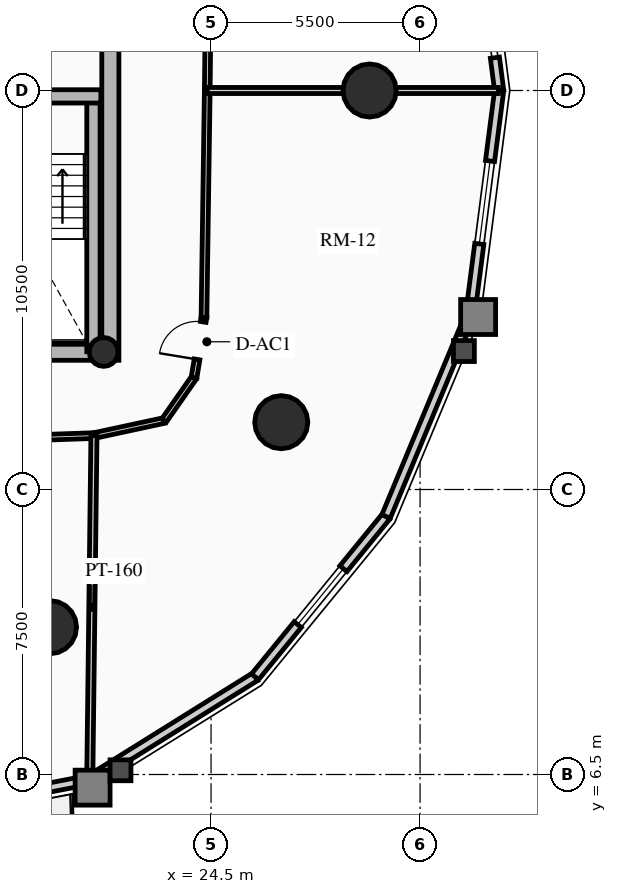
"""IFC4 building model, lengths in metres.
Left out: names, types, materials, properties, quantities, classifications, styles, units other than length and angle.
Written with IfcOpenShell. Run it as: python <this file> out.ifc"""

import sys

from ifc_helpers import new_model, si_unit, direction, frame, frame_2d, origin, origin_2d, place, context, subcontext, project, spatial, rectangle, circle, hollow_circle, extrude, source, transform, mapped, element, fill, save


model = new_model("IFC4")
c1 = context("Model", 3, precision=1e-05, world=origin(), true_north=direction((0.0, 1.0)))
c2 = subcontext(c1, "Body", "Model", "MODEL_VIEW")
j1 = project(units=[si_unit("LENGTHUNIT", "METRE"), si_unit("PLANEANGLEUNIT", "RADIAN")], contexts=[c1])
p1 = place(None, origin())
s1 = spatial("IfcSite", under=j1, at=p1, CompositionType="ELEMENT")
p2 = place(p1, origin())
s2 = spatial("IfcBuilding", under=s1, at=p2, CompositionType="ELEMENT")
p3 = place(p2, frame((0.0, 0.0, 75.97)))
s3 = spatial("IfcBuildingStorey", under=s2, at=p3, CompositionType="ELEMENT", Elevation=75.97)
p4 = place(p3, frame((21.85, 17.4, 0.0), z_axis=(0.0, 0.0, 1.0), x_axis=(0.0, 1.0, 0.0)))
e1 = element("IfcWall", 1, at=p4, inside=s3, PredefinedType="SHEAR", context=c2, shape_type="SweptSolid", body=[
    extrude(rectangle(XDim=14.2, YDim=0.45, at=frame_2d((7.1, 0.0))), origin(), (0.0, 0.0, 1.0), 2.91),
])
p5 = place(p3, frame((11.15, 17.625, 0.0), z_axis=(0.0, 0.0, 1.0), x_axis=(1.0, 0.0, 0.0)))
e2 = element("IfcWall", 2, at=p5, inside=s3, PredefinedType="SHEAR", context=c2, shape_type="SweptSolid", body=[
    extrude(rectangle(XDim=10.7, YDim=0.45, at=frame_2d((5.35, 0.0))), origin(), (0.0, 0.0, 1.0), 2.91),
])
m1 = source(origin(), c2, "Body", "SweptSolid", [
    extrude(rectangle(XDim=1.5, YDim=2.02, at=frame_2d((0.75, 1.01))), frame((0.0, 0.235, 0.0), z_axis=(0.0, -1.0, 0.0), x_axis=(1.0, 0.0, 0.0)), (0.0, 0.0, 1.0), 0.47),
])
p6 = place(p5, frame((5.45, 0.0, 0.0)))
e3 = element("IfcOpeningElement", 3, at=p6, cuts=e2, PredefinedType="OPENING", context=c2, shape_type="MappedRepresentation", body=[
    mapped(m1, transform((0.0, 0.0, 0.0), x_axis=(1.0, 0.0, 0.0), y_axis=(0.0, 1.0, 0.0), z_axis=(0.0, 0.0, 1.0), scale=1.0)),
])
p7 = place(p3, frame((21.405, 17.625, 0.0), z_axis=(0.0, 0.0, 1.0), x_axis=(0.0, 1.0, 0.0)))
e4 = element("IfcWall", 4, at=p7, inside=s3, PredefinedType="SHEAR", context=c2, shape_type="SweptSolid", body=[
    extrude(rectangle(XDim=6.72, YDim=0.35, at=frame_2d((3.36, 0.0))), origin(), (0.0, 0.0, 1.0), 2.91),
])
p8 = place(p3, frame((18.315, 24.345, 0.0), z_axis=(0.0, 0.0, 1.0), x_axis=(1.0, 0.0, 0.0)))
e5 = element("IfcWall", 5, at=p8, inside=s3, PredefinedType="SHEAR", context=c2, shape_type="SweptSolid", body=[
    extrude(rectangle(XDim=3.285, YDim=0.35, at=frame_2d((1.643, 0.0))), origin(), (0.0, 0.0, 1.0), 2.91),
])
p9 = place(p3, frame((21.675, 17.62, 0.0), z_axis=(0.0, 0.0, 1.0), x_axis=(1.0, 0.0, 0.0)))
e6 = element("IfcColumn", 6, at=p9, inside=s3, PredefinedType="COLUMN", context=c2, shape_type="SweptSolid", body=[
    extrude(hollow_circle(Radius=0.38, WallThickness=0.032, at=origin_2d()), origin(), (0.0, 0.0, 1.0), 2.91),
])
for number, where, z_axis, x_axis in (
    (7, (28.672, 24.5, 0.0), (0.0, 0.0, 1.0), (1.0, 0.0, 0.0)),
    (8, (20.261, 10.377, 0.0), (0.0, 0.0, 1.0), (1.0, 0.0, 0.0)),
    (9, (26.347, 15.771, 0.0), (0.0, 0.0, 1.0), (1.0, 0.0, 0.0)),
):
    element("IfcColumn", number, at=place(p3, frame(where, z_axis=z_axis, x_axis=x_axis)), inside=s3, PredefinedType="USERDEFINED", context=c2, shape_type="SweptSolid", body=[
        extrude(circle(Radius=0.7, at=origin_2d()), origin(), (0.0, 0.0, 1.0), 2.91),
    ])
p10 = place(p3, frame((31.969, 25.363, 0.0), z_axis=(0.0, 0.0, 1.0), x_axis=(0.128523364007, -0.991706481225, 0.0)))
e10 = element("IfcWall", 10, at=p10, inside=s3, PredefinedType="SOLIDWALL", context=c2, shape_type="SweptSolid", body=[
    extrude(rectangle(XDim=0.87, YDim=0.24, at=frame_2d((0.435, 0.0))), origin(), (0.0, 0.0, 1.0), 2.655),
])
p11 = place(p3, frame((21.315, 6.363, 0.0), z_axis=(0.0, 0.0, 1.0), x_axis=(-0.981723785992, -0.190311344954, 0.0)))
e11 = element("IfcWall", 11, at=p11, inside=s3, PredefinedType="SOLIDWALL", context=c2, shape_type="SweptSolid", body=[
    extrude(rectangle(XDim=4.904, YDim=0.24, at=frame_2d((2.452, 0.0))), origin(), (0.0, 0.0, 1.0), 2.179),
])
m2 = source(origin(), c2, "Body", "SweptSolid", [
    extrude(rectangle(XDim=1.15, YDim=2.005, at=frame_2d((0.575, 1.002))), frame((0.0, 0.13, 0.0), z_axis=(0.0, -1.0, 0.0), x_axis=(1.0, 0.0, 0.0)), (0.0, 0.0, 1.0), 0.26),
])
p12 = place(p11, frame((1.877, 0.0, 0.0)))
e12 = element("IfcOpeningElement", 12, at=p12, cuts=e11, PredefinedType="OPENING", context=c2, shape_type="MappedRepresentation", body=[
    mapped(m2, transform((0.0, 0.0, 0.0), x_axis=(1.0, 0.0, 0.0), y_axis=(0.0, 1.0, 0.0), z_axis=(0.0, 0.0, 1.0), scale=1.0)),
])
p13 = place(p3, frame((25.658, 9.072, 0.0), z_axis=(0.0, 0.0, 1.0), x_axis=(-0.848520380187, -0.529162701263, 0.0)))
e13 = element("IfcWall", 13, at=p13, inside=s3, PredefinedType="SOLIDWALL", context=c2, shape_type="SweptSolid", body=[
    extrude(rectangle(XDim=5.119, YDim=0.24, at=frame_2d((2.56, 0.0))), origin(), (0.0, 0.0, 1.0), 2.179),
])
p14 = place(p3, frame((29.105, 13.291, 0.0), z_axis=(0.0, 0.0, 1.0), x_axis=(-0.632700781152, -0.77439635945, 0.0)))
e14 = element("IfcWall", 14, at=p14, inside=s3, PredefinedType="SOLIDWALL", context=c2, shape_type="SweptSolid", body=[
    extrude(rectangle(XDim=5.448, YDim=0.24, at=frame_2d((2.724, 0.0))), origin(), (0.0, 0.0, 1.0), 2.179),
])
m3 = source(origin(), c2, "Body", "SweptSolid", [
    extrude(rectangle(XDim=1.9, YDim=1.35, at=frame_2d((0.95, 0.675))), frame((0.0, 0.13, 0.0), z_axis=(0.0, -1.0, 0.0), x_axis=(1.0, 0.0, 0.0)), (0.0, 0.0, 1.0), 0.26),
])
p15 = place(p14, frame((1.774, 0.0, 0.65)))
e15 = element("IfcOpeningElement", 15, at=p15, cuts=e14, PredefinedType="OPENING", context=c2, shape_type="MappedRepresentation", body=[
    mapped(m3, transform((0.0, 0.0, 0.0), x_axis=(1.0, 0.0, 0.0), y_axis=(0.0, 1.0, 0.0), z_axis=(0.0, 0.0, 1.0), scale=1.0)),
])
p16 = place(p3, frame((31.318, 18.607, 0.0), z_axis=(0.0, 0.0, 1.0), x_axis=(-0.384344417632, -0.923189779317, 0.0)))
e16 = element("IfcWall", 16, at=p16, inside=s3, PredefinedType="SOLIDWALL", context=c2, shape_type="SweptSolid", body=[
    extrude(rectangle(XDim=5.758, YDim=0.24, at=frame_2d((2.879, 0.0))), origin(), (0.0, 0.0, 1.0), 2.179),
])
p17 = place(p3, frame((32.081, 24.5, 0.0), z_axis=(0.0, 0.0, 1.0), x_axis=(-0.128351991996, -0.991728675672, 0.0)))
e17 = element("IfcWall", 17, at=p17, inside=s3, PredefinedType="SOLIDWALL", context=c2, shape_type="SweptSolid", body=[
    extrude(rectangle(XDim=5.942, YDim=0.24, at=frame_2d((2.971, 0.0))), origin(), (0.0, 0.0, 1.0), 2.179),
])
m4 = source(origin(), c2, "Body", "SweptSolid", [
    extrude(rectangle(XDim=2.2, YDim=1.35, at=frame_2d((1.1, 0.675))), frame((0.0, 0.13, 0.0), z_axis=(0.0, -1.0, 0.0), x_axis=(1.0, 0.0, 0.0)), (0.0, 0.0, 1.0), 0.26),
])
p18 = place(p17, frame((1.871, 0.0, 0.65)))
e18 = element("IfcOpeningElement", 18, at=p18, cuts=e17, PredefinedType="OPENING", context=c2, shape_type="MappedRepresentation", body=[
    mapped(m4, transform((0.0, 0.0, 0.0), x_axis=(1.0, 0.0, 0.0), y_axis=(0.0, 1.0, 0.0), z_axis=(0.0, 0.0, 1.0), scale=1.0)),
])
p19 = place(p3, frame((24.4, 24.5, 0.0), z_axis=(0.0, 0.0, 1.0), x_axis=(0.011359710161, 0.999935476411, 0.0)))
e19 = element("IfcWall", 19, at=p19, inside=s3, PredefinedType="PARTITIONING", context=c2, shape_type="SweptSolid", body=[
    extrude(rectangle(XDim=6.082, YDim=0.15, at=frame_2d((3.041, 0.0))), origin(), (0.0, 0.0, 1.0), 2.225),
])
p20 = place(p3, frame((14.781, 15.191, 0.0), z_axis=(0.0, 0.0, 1.0), x_axis=(0.999412963972, 0.034259705842, 0.0)))
e20 = element("IfcWall", 20, at=p20, inside=s3, PredefinedType="PARTITIONING", context=c2, shape_type="SweptSolid", body=[
    extrude(rectangle(XDim=6.642, YDim=0.15, at=frame_2d((3.321, 0.0))), origin(), (0.0, 0.0, 1.0), 2.225),
])
p21 = place(p3, frame((21.419, 15.418, 0.0), z_axis=(0.0, 0.0, 1.0), x_axis=(0.977540384091, 0.210748184977, 0.0)))
e21 = element("IfcWall", 21, at=p21, inside=s3, PredefinedType="PARTITIONING", context=c2, shape_type="SweptSolid", body=[
    extrude(rectangle(XDim=1.887, YDim=0.15, at=frame_2d((0.944, 0.0))), origin(), (0.0, 0.0, 1.0), 2.225),
])
p22 = place(p3, frame((23.263, 15.816, 0.0), z_axis=(0.0, 0.0, 1.0), x_axis=(0.572652947117, 0.819797903241, 0.0)))
e22 = element("IfcWall", 22, at=p22, inside=s3, PredefinedType="PARTITIONING", context=c2, shape_type="SweptSolid", body=[
    extrude(rectangle(XDim=1.377, YDim=0.15, at=frame_2d((0.688, 0.0))), origin(), (0.0, 0.0, 1.0), 2.225),
])
p23 = place(p3, frame((24.052, 16.945, 0.0), z_axis=(0.0, 0.0, 1.0), x_axis=(0.162869842843, 0.986647563364, 0.0)))
e23 = element("IfcWall", 23, at=p23, inside=s3, PredefinedType="PARTITIONING", context=c2, shape_type="SweptSolid", body=[
    extrude(rectangle(XDim=1.605, YDim=0.15, at=frame_2d((0.803, 0.0))), origin(), (0.0, 0.0, 1.0), 2.225),
])
m5 = source(origin(), c2, "Body", "SweptSolid", [
    extrude(rectangle(XDim=1.0, YDim=2.015, at=frame_2d((0.5, 1.007))), frame((0.0, 0.085, 0.0), z_axis=(0.0, -1.0, 0.0), x_axis=(1.0, 0.0, 0.0)), (0.0, 0.0, 1.0), 0.17),
])
p24 = place(p23, frame((0.485, 0.0, 0.0)))
e24 = element("IfcOpeningElement", 24, at=p24, cuts=e23, PredefinedType="OPENING", context=c2, shape_type="MappedRepresentation", body=[
    mapped(m5, transform((0.0, 0.0, 0.0), x_axis=(1.0, 0.0, 0.0), y_axis=(0.0, 1.0, 0.0), z_axis=(0.0, 0.0, 1.0), scale=1.0)),
])
p25 = place(p3, frame((24.313, 18.529, 0.0), z_axis=(0.0, 0.0, 1.0), x_axis=(0.014472275982, 0.99989527113, 0.0)))
e25 = element("IfcWall", 25, at=p25, inside=s3, PredefinedType="PARTITIONING", context=c2, shape_type="SweptSolid", body=[
    extrude(rectangle(XDim=5.972, YDim=0.15, at=frame_2d((2.986, 0.0))), origin(), (0.0, 0.0, 1.0), 2.655),
])
p26 = place(p3, frame((24.4, 24.5, 0.0), z_axis=(0.0, 0.0, 1.0), x_axis=(1.0, 0.0, 0.0)))
e26 = element("IfcWall", 26, at=p26, inside=s3, PredefinedType="PARTITIONING", context=c2, shape_type="SweptSolid", body=[
    extrude(rectangle(XDim=7.661, YDim=0.16, at=frame_2d((3.831, 0.0))), origin(), (0.0, 0.0, 1.0), 2.179),
])
p27 = place(p3, frame((21.419, 15.418, 0.0), z_axis=(0.0, 0.0, 1.0), x_axis=(-0.012184661849, -0.999925764252, 0.0)))
e27 = element("IfcWall", 27, at=p27, inside=s3, PredefinedType="PARTITIONING", context=c2, shape_type="SweptSolid", body=[
    extrude(rectangle(XDim=9.037, YDim=0.16, at=frame_2d((4.518, 0.0))), origin(), (0.0, 0.0, 1.0), 2.179),
])
m6 = source(origin(), c2, "Body", "SweptSolid", [
    extrude(rectangle(XDim=1.9, YDim=1.35, at=frame_2d((0.95, 0.675))), frame((0.0, 0.03, 0.0), z_axis=(0.0, -1.0, 0.0), x_axis=(1.0, 0.0, 0.0)), (0.0, 0.0, 1.0), 0.06),
])
p28 = place(p15, origin())
e28 = element("IfcWindow", 28, at=p28, inside=s3, PartitioningType="DOUBLE_PANEL_VERTICAL", PredefinedType="WINDOW", context=c2, shape_type="MappedRepresentation", body=[
    mapped(m6, transform((0.0, 0.0, 0.0), x_axis=(1.0, 0.0, 0.0), y_axis=(0.0, 1.0, 0.0), z_axis=(0.0, 0.0, 1.0), scale=1.0)),
])
fill(e15, e28)
m7 = source(origin(), c2, "Body", "SweptSolid", [
    extrude(rectangle(XDim=2.2, YDim=1.35, at=frame_2d((1.1, 0.675))), frame((0.0, 0.03, 0.0), z_axis=(0.0, -1.0, 0.0), x_axis=(1.0, 0.0, 0.0)), (0.0, 0.0, 1.0), 0.06),
])
p29 = place(p18, origin())
e29 = element("IfcWindow", 29, at=p29, inside=s3, PartitioningType="DOUBLE_PANEL_VERTICAL", PredefinedType="WINDOW", context=c2, shape_type="MappedRepresentation", body=[
    mapped(m7, transform((0.0, 0.0, 0.0), x_axis=(1.0, 0.0, 0.0), y_axis=(0.0, 1.0, 0.0), z_axis=(0.0, 0.0, 1.0), scale=1.0)),
])
fill(e18, e29)
m8 = source(origin(), c2, "Body", "SweptSolid", [
    extrude(rectangle(XDim=1.0, YDim=2.015, at=frame_2d((0.5, 1.007))), frame((0.0, 0.025, 0.0), z_axis=(0.0, -1.0, 0.0), x_axis=(1.0, 0.0, 0.0)), (0.0, 0.0, 1.0), 0.05),
])
p30 = place(p24, origin())
e30 = element("IfcDoor", 30, at=p30, inside=s3, OperationType="SINGLE_SWING_LEFT", PredefinedType="DOOR", context=c2, shape_type="MappedRepresentation", body=[
    mapped(m8, transform((0.0, 0.0, 0.0), x_axis=(1.0, 0.0, 0.0), y_axis=(0.0, 1.0, 0.0), z_axis=(0.0, 0.0, 1.0), scale=1.0)),
])
fill(e24, e30)
save(model, sys.argv[1])
